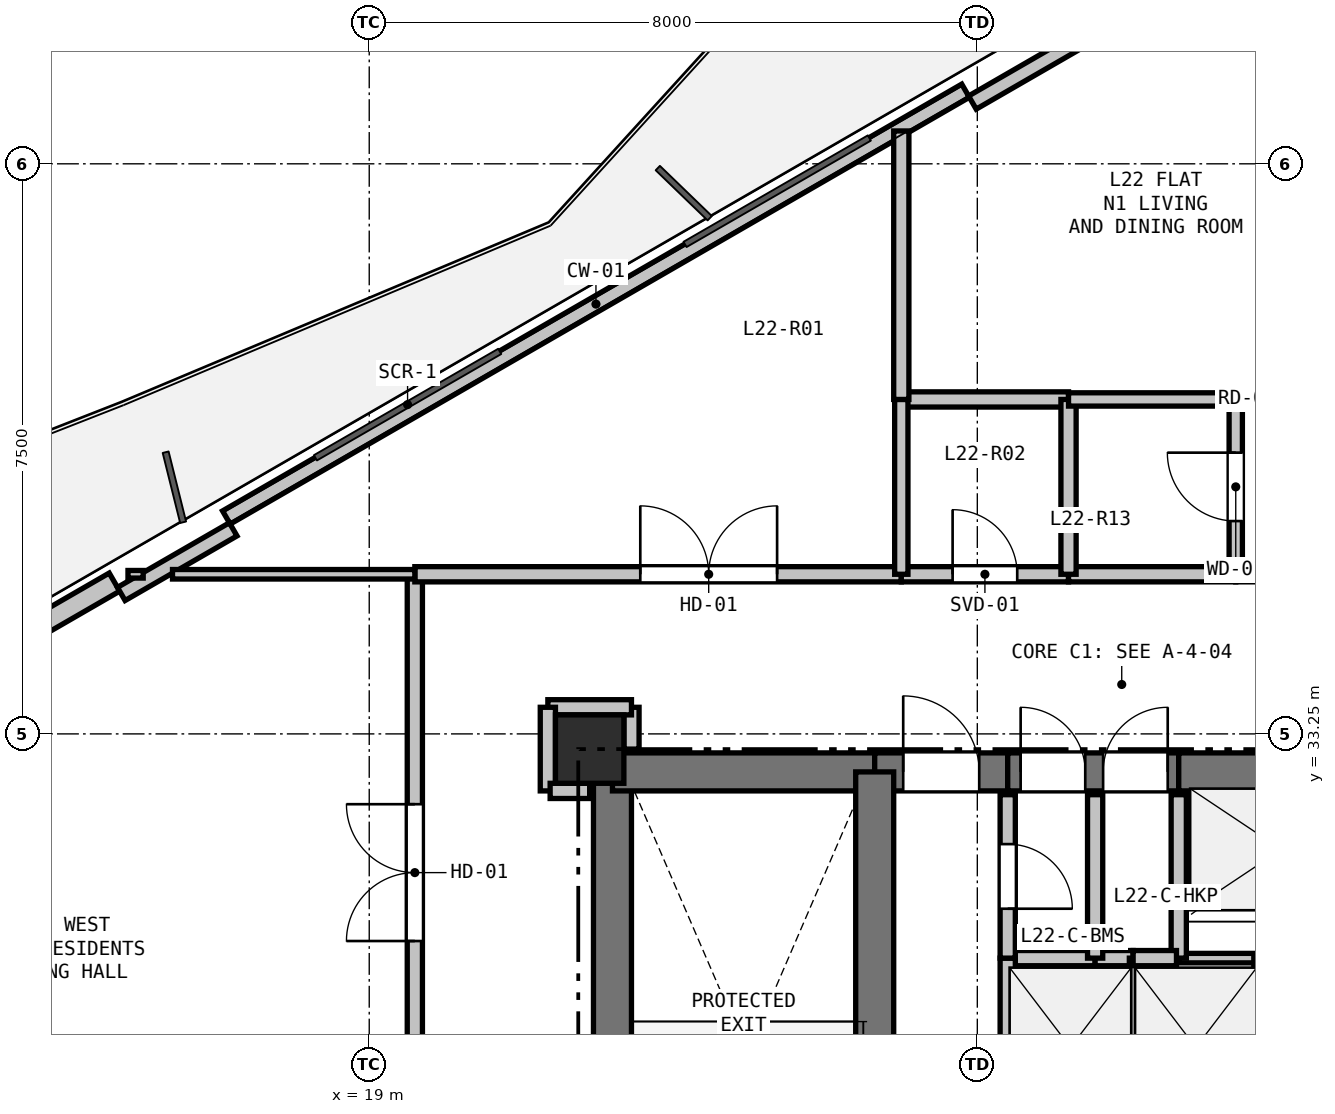
"""IFC4 building model, lengths in metres.
Left out: names, types, materials, properties, quantities, classifications, styles, units other than length and angle.
Written with IfcOpenShell. Run it as: python <this file> out.ifc"""

import sys

from ifc_helpers import new_model, si_unit, direction, frame, frame_2d, origin, origin_2d, place, context, subcontext, project, spatial, rectangle, extrude, element, fill, save


model = new_model("IFC4")
c1 = context("Model", 3, precision=1e-05, world=origin(), true_north=direction((0.0, 1.0)))
c2 = subcontext(c1, "Body", "Model", "MODEL_VIEW")
j1 = project(units=[si_unit("LENGTHUNIT", "METRE"), si_unit("PLANEANGLEUNIT", "RADIAN")], contexts=[c1])
p1 = place(None, origin())
s1 = spatial("IfcSite", under=j1, at=p1, CompositionType="ELEMENT")
p2 = place(p1, origin())
s2 = spatial("IfcBuilding", under=s1, at=p2, CompositionType="ELEMENT")
p3 = place(p2, frame((0.0, 0.0, 83.4)))
s3 = spatial("IfcBuildingStorey", under=s2, at=p3, CompositionType="ELEMENT", Elevation=83.4)
p4 = place(p3, frame((21.9, 33.05, 0.0), z_axis=(0.0, 0.0, 1.0), x_axis=(1.0, 0.0, 0.0)))
e1 = element("IfcColumn", 1, at=p4, inside=s3, PredefinedType="COLUMN", context=c2, shape_type="SweptSolid", body=[
    extrude(rectangle(XDim=0.9, YDim=0.9, at=origin_2d()), origin(), (0.0, 0.0, 1.0), 3.3),
])
p5 = place(p3, frame((5.317, 29.282, 0.0), z_axis=(0.0, 0.0, 1.0), x_axis=(0.866023023012, 0.500004123596, 0.0)))
e2 = element("IfcWall", 2, at=p5, inside=s3, PredefinedType="SOLIDWALL", context=c2, shape_type="SweptSolid", body=[
    extrude(rectangle(XDim=11.93, YDim=0.275, at=frame_2d((5.965, 0.0))), origin(), (0.0, 0.0, 1.0), 2.67),
])
p6 = place(p5, frame((8.704, 0.0, 0.0)))
e3 = element("IfcOpeningElement", 3, at=p6, cuts=e2, PredefinedType="OPENING", context=c2, shape_type="SweptSolid", body=[
    extrude(rectangle(XDim=1.0, YDim=2.1, at=frame_2d((0.5, 1.05))), frame((0.0, 0.147, 0.0), z_axis=(0.0, -1.0, 0.0), x_axis=(1.0, 0.0, 0.0)), (0.0, 0.0, 1.0), 0.295),
])
p7 = place(p3, frame((17.12, 36.097, 0.0), z_axis=(0.0, 0.0, 1.0), x_axis=(0.866027010039, 0.499997217876, 0.0)))
e4 = element("IfcWall", 4, at=p7, inside=s3, PredefinedType="PARAPET", context=c2, shape_type="SweptSolid", body=[
    extrude(rectangle(XDim=11.229, YDim=0.2, at=frame_2d((5.615, 0.0))), origin(), (0.0, 0.0, 1.0), 0.2),
])
p8 = place(p3, frame((15.738, 35.091, 0.0), z_axis=(0.0, 0.0, 1.0), x_axis=(0.866025371046, 0.500000056704, 0.0)))
e5 = element("IfcWall", 5, at=p8, inside=s3, PredefinedType="PARAPET", context=c2, shape_type="SweptSolid", body=[
    extrude(rectangle(XDim=1.7, YDim=0.2, at=frame_2d((0.85, 0.0))), origin(), (0.0, 0.0, 1.0), 2.67),
])
p9 = place(p3, frame((26.935, 41.556, 0.0), z_axis=(0.0, 0.0, 1.0), x_axis=(0.86605165483, 0.499954529098, 0.0)))
e6 = element("IfcWall", 6, at=p9, inside=s3, PredefinedType="PARAPET", context=c2, shape_type="SweptSolid", body=[
    extrude(rectangle(XDim=1.7, YDim=0.2, at=frame_2d((0.85, 0.0))), origin(), (0.0, 0.0, 1.0), 2.67),
])
p10 = place(p3, frame((22.2, 25.4, 0.0), z_axis=(0.0, 0.0, 1.0), x_axis=(0.0, 1.0, 0.0)))
e7 = element("IfcWall", 7, at=p10, inside=s3, PredefinedType="SHEAR", context=c2, shape_type="SweptSolid", body=[
    extrude(rectangle(XDim=7.35, YDim=0.5, at=frame_2d((3.675, 0.0))), origin(), (0.0, 0.0, 1.0), 3.05),
])
p11 = place(p3, frame((22.2, 32.75, 0.0), z_axis=(0.0, 0.0, 1.0), x_axis=(1.0, 0.0, 0.0)))
e8 = element("IfcWall", 8, at=p11, inside=s3, PredefinedType="SHEAR", context=c2, shape_type="SweptSolid", body=[
    extrude(rectangle(XDim=3.45, YDim=0.5, at=frame_2d((1.725, 0.0))), origin(), (0.0, 0.0, 1.0), 3.05),
])
p12 = place(p3, frame((25.65, 32.75, 0.0), z_axis=(0.0, 0.0, 1.0), x_axis=(1.0, 0.0, 0.0)))
e9 = element("IfcWall", 9, at=p12, inside=s3, PredefinedType="SHEAR", context=c2, shape_type="SweptSolid", body=[
    extrude(rectangle(XDim=1.75, YDim=0.5, at=frame_2d((0.875, 0.0))), origin(), (0.0, 0.0, 1.0), 3.05),
])
p13 = place(p12, frame((0.375, 0.0, 0.0)))
e10 = element("IfcOpeningElement", 10, at=p13, cuts=e9, PredefinedType="OPENING", context=c2, shape_type="SweptSolid", body=[
    extrude(rectangle(XDim=1.0, YDim=2.15, at=frame_2d((0.5, 1.075))), frame((0.0, 0.26, 0.0), z_axis=(0.0, -1.0, 0.0), x_axis=(1.0, 0.0, 0.0)), (0.0, 0.0, 1.0), 0.52),
])
p14 = place(p3, frame((27.4, 32.75, 0.0), z_axis=(0.0, 0.0, 1.0), x_axis=(1.0, 0.0, 0.0)))
e11 = element("IfcWall", 11, at=p14, inside=s3, PredefinedType="SHEAR", context=c2, shape_type="SweptSolid", body=[
    extrude(rectangle(XDim=2.25, YDim=0.5, at=frame_2d((1.125, 0.0))), origin(), (0.0, 0.0, 1.0), 3.05),
])
p15 = place(p14, frame((0.17, 0.0, 0.0)))
e12 = element("IfcOpeningElement", 12, at=p15, cuts=e11, PredefinedType="OPENING", context=c2, shape_type="SweptSolid", body=[
    extrude(rectangle(XDim=0.85, YDim=2.1, at=frame_2d((0.425, 1.05))), frame((0.0, 0.26, 0.0), z_axis=(0.0, -1.0, 0.0), x_axis=(1.0, 0.0, 0.0)), (0.0, 0.0, 1.0), 0.52),
])
p16 = place(p14, frame((1.255, 0.0, 0.0)))
e13 = element("IfcOpeningElement", 13, at=p16, cuts=e11, PredefinedType="OPENING", context=c2, shape_type="SweptSolid", body=[
    extrude(rectangle(XDim=0.85, YDim=2.1, at=frame_2d((0.425, 1.05))), frame((0.0, 0.26, 0.0), z_axis=(0.0, -1.0, 0.0), x_axis=(1.0, 0.0, 0.0)), (0.0, 0.0, 1.0), 0.52),
])
p17 = place(p3, frame((29.65, 32.75, 0.0), z_axis=(0.0, 0.0, 1.0), x_axis=(1.0, 0.0, 0.0)))
e14 = element("IfcWall", 14, at=p17, inside=s3, PredefinedType="SHEAR", context=c2, shape_type="SweptSolid", body=[
    extrude(rectangle(XDim=2.7, YDim=0.5, at=frame_2d((1.35, 0.0))), origin(), (0.0, 0.0, 1.0), 3.05),
])
p18 = place(p3, frame((25.65, 27.95, 0.0), z_axis=(0.0, 0.0, 1.0), x_axis=(0.0, 1.0, 0.0)))
e15 = element("IfcWall", 15, at=p18, inside=s3, PredefinedType="SHEAR", context=c2, shape_type="SweptSolid", body=[
    extrude(rectangle(XDim=4.8, YDim=0.5, at=frame_2d((2.4, 0.0))), origin(), (0.0, 0.0, 1.0), 3.05),
])
p19 = place(p3, frame((30.7, 30.3, 0.0), z_axis=(0.0, 0.0, 1.0), x_axis=(-1.0, 0.0, 0.0)))
e16 = element("IfcWall", 16, at=p19, inside=s3, PredefinedType="PARTITIONING", context=c2, shape_type="SweptSolid", body=[
    extrude(rectangle(XDim=1.05, YDim=0.125, at=frame_2d((0.525, 0.0))), origin(), (0.0, 0.0, 1.0), 3.05),
])
p20 = place(p3, frame((29.65, 30.3, 0.0), z_axis=(0.0, 0.0, 1.0), x_axis=(0.0, 1.0, 0.0)))
e17 = element("IfcWall", 17, at=p20, inside=s3, PredefinedType="PARTITIONING", context=c2, shape_type="SweptSolid", body=[
    extrude(rectangle(XDim=2.15, YDim=0.2, at=frame_2d((1.075, 0.0))), origin(), (0.0, 0.0, 1.0), 3.05),
])
p21 = place(p3, frame((27.4, 30.3, 0.0), z_axis=(0.0, 0.0, 1.0), x_axis=(1.0, 0.0, 0.0)))
e18 = element("IfcWall", 18, at=p21, inside=s3, PredefinedType="PARTITIONING", context=c2, shape_type="SweptSolid", body=[
    extrude(rectangle(XDim=1.15, YDim=0.2, at=frame_2d((0.575, 0.0))), origin(), (0.0, 0.0, 1.0), 3.05),
])
p22 = place(p3, frame((28.55, 30.3, 0.0), z_axis=(0.0, 0.0, 1.0), x_axis=(1.0, 0.0, 0.0)))
e19 = element("IfcWall", 19, at=p22, inside=s3, PredefinedType="PARTITIONING", context=c2, shape_type="SweptSolid", body=[
    extrude(rectangle(XDim=0.5, YDim=0.2, at=frame_2d((0.25, 0.0))), origin(), (0.0, 0.0, 1.0), 3.05),
])
p23 = place(p3, frame((29.05, 30.3, 0.0), z_axis=(0.0, 0.0, 1.0), x_axis=(0.0, -1.0, 0.0)))
e20 = element("IfcWall", 20, at=p23, inside=s3, PredefinedType="PARTITIONING", context=c2, shape_type="SweptSolid", body=[
    extrude(rectangle(XDim=2.2, YDim=0.1, at=frame_2d((1.1, 0.0))), origin(), (0.0, 0.0, 1.0), 3.05),
])
p24 = place(p3, frame((27.4, 28.1, 0.0), z_axis=(0.0, 0.0, 1.0), x_axis=(0.0, 1.0, 0.0)))
e21 = element("IfcWall", 21, at=p24, inside=s3, PredefinedType="PARTITIONING", context=c2, shape_type="SweptSolid", body=[
    extrude(rectangle(XDim=2.2, YDim=0.2, at=frame_2d((1.1, 0.0))), origin(), (0.0, 0.0, 1.0), 3.05),
])
p25 = place(p3, frame((29.05, 30.3, 0.0), z_axis=(0.0, 0.0, 1.0), x_axis=(1.0, 0.0, 0.0)))
e22 = element("IfcWall", 22, at=p25, inside=s3, PredefinedType="PARTITIONING", context=c2, shape_type="SweptSolid", body=[
    extrude(rectangle(XDim=0.57, YDim=0.2, at=frame_2d((0.285, 0.0))), origin(), (0.0, 0.0, 1.0), 3.05),
])
p26 = place(p3, frame((30.7, 30.3, 0.0), z_axis=(0.0, 0.0, 1.0), x_axis=(0.0, -1.0, 0.0)))
e23 = element("IfcWall", 23, at=p26, inside=s3, PredefinedType="PARTITIONING", context=c2, shape_type="SweptSolid", body=[
    extrude(rectangle(XDim=2.2, YDim=0.125, at=frame_2d((1.1, 0.0))), origin(), (0.0, 0.0, 1.0), 3.05),
])
p27 = place(p3, frame((27.4, 32.45, 0.0), z_axis=(0.0, 0.0, 1.0), x_axis=(0.0, -1.0, 0.0)))
e24 = element("IfcWall", 24, at=p27, inside=s3, PredefinedType="PARTITIONING", context=c2, shape_type="SweptSolid", body=[
    extrude(rectangle(XDim=2.15, YDim=0.2, at=frame_2d((1.075, 0.0))), origin(), (0.0, 0.0, 1.0), 3.05),
])
p28 = place(p27, frame((0.65, 0.0, 0.0)))
e25 = element("IfcOpeningElement", 25, at=p28, cuts=e24, PredefinedType="OPENING", context=c2, shape_type="SweptSolid", body=[
    extrude(rectangle(XDim=0.85, YDim=2.1, at=frame_2d((0.425, 1.05))), frame((0.0, 0.11, 0.0), z_axis=(0.0, -1.0, 0.0), x_axis=(1.0, 0.0, 0.0)), (0.0, 0.0, 1.0), 0.22),
])
p29 = place(p3, frame((19.6, 27.5, 0.0), z_axis=(0.0, 0.0, 1.0), x_axis=(0.0, 1.0, 0.0)))
e26 = element("IfcWall", 26, at=p29, inside=s3, PredefinedType="PARTITIONING", context=c2, shape_type="SweptSolid", body=[
    extrude(rectangle(XDim=7.85, YDim=0.2, at=frame_2d((3.925, 0.0))), origin(), (0.0, 0.0, 1.0), 2.423),
])
p30 = place(p29, frame((3.025, 0.0, 0.0)))
e27 = element("IfcOpeningElement", 27, at=p30, cuts=e26, PredefinedType="OPENING", context=c2, shape_type="SweptSolid", body=[
    extrude(rectangle(XDim=1.8, YDim=2.2, at=frame_2d((0.9, 1.1))), frame((0.0, 0.11, 0.0), z_axis=(0.0, -1.0, 0.0), x_axis=(1.0, 0.0, 0.0)), (0.0, 0.0, 1.0), 0.22),
])
p31 = place(p3, frame((19.6, 35.35, 0.0), z_axis=(0.0, 0.0, 1.0), x_axis=(1.0, 0.0, 0.0)))
e28 = element("IfcWall", 28, at=p31, inside=s3, PredefinedType="PARTITIONING", context=c2, shape_type="SweptSolid", body=[
    extrude(rectangle(XDim=6.4, YDim=0.2, at=frame_2d((3.2, 0.0))), origin(), (0.0, 0.0, 1.0), 3.05),
])
p32 = place(p31, frame((2.966, 0.0, 0.0)))
e29 = element("IfcOpeningElement", 29, at=p32, cuts=e28, PredefinedType="OPENING", context=c2, shape_type="SweptSolid", body=[
    extrude(rectangle(XDim=1.8, YDim=2.2, at=frame_2d((0.9, 1.1))), frame((0.0, 0.11, 0.0), z_axis=(0.0, -1.0, 0.0), x_axis=(1.0, 0.0, 0.0)), (0.0, 0.0, 1.0), 0.22),
])
p33 = place(p3, frame((26.0, 35.35, 0.0), z_axis=(0.0, 0.0, 1.0), x_axis=(1.0, 0.0, 0.0)))
e30 = element("IfcWall", 30, at=p33, inside=s3, PredefinedType="PARTITIONING", context=c2, shape_type="SweptSolid", body=[
    extrude(rectangle(XDim=2.2, YDim=0.2, at=frame_2d((1.1, 0.0))), origin(), (0.0, 0.0, 1.0), 3.05),
])
p34 = place(p33, frame((0.675, 0.0, 0.0)))
e31 = element("IfcOpeningElement", 31, at=p34, cuts=e30, PredefinedType="OPENING", context=c2, shape_type="SweptSolid", body=[
    extrude(rectangle(XDim=0.85, YDim=2.1, at=frame_2d((0.425, 1.05))), frame((0.0, 0.11, 0.0), z_axis=(0.0, -1.0, 0.0), x_axis=(1.0, 0.0, 0.0)), (0.0, 0.0, 1.0), 0.22),
])
p35 = place(p3, frame((28.2, 35.35, 0.0), z_axis=(0.0, 0.0, 1.0), x_axis=(1.0, 0.0, 0.0)))
e32 = element("IfcWall", 32, at=p35, inside=s3, PredefinedType="PARTITIONING", context=c2, shape_type="SweptSolid", body=[
    extrude(rectangle(XDim=2.2, YDim=0.2, at=frame_2d((1.1, 0.0))), origin(), (0.0, 0.0, 1.0), 3.05),
])
p36 = place(p3, frame((30.4, 35.35, 0.0), z_axis=(0.0, 0.0, 1.0), x_axis=(1.0, 0.0, 0.0)))
e33 = element("IfcWall", 33, at=p36, inside=s3, PredefinedType="PARTITIONING", context=c2, shape_type="SweptSolid", body=[
    extrude(rectangle(XDim=2.8, YDim=0.2, at=frame_2d((1.4, 0.0))), origin(), (0.0, 0.0, 1.0), 3.05),
])
p37 = place(p36, frame((0.9, 0.0, 0.0)))
e34 = element("IfcOpeningElement", 34, at=p37, cuts=e33, PredefinedType="OPENING", context=c2, shape_type="SweptSolid", body=[
    extrude(rectangle(XDim=1.0, YDim=2.15, at=frame_2d((0.5, 1.075))), frame((0.0, 0.11, 0.0), z_axis=(0.0, -1.0, 0.0), x_axis=(1.0, 0.0, 0.0)), (0.0, 0.0, 1.0), 0.22),
])
p38 = place(p3, frame((22.45, 33.05, 0.0), z_axis=(0.0, 0.0, 1.0), x_axis=(0.0, 1.0, 0.0)))
e35 = element("IfcWall", 35, at=p38, inside=s3, PredefinedType="PARTITIONING", context=c2, shape_type="SweptSolid", body=[
    extrude(rectangle(XDim=0.55, YDim=0.2, at=frame_2d((0.275, 0.0))), origin(), (0.0, 0.0, 1.0), 2.498),
])
p39 = place(p3, frame((22.45, 33.6, 0.0), z_axis=(0.0, 0.0, 1.0), x_axis=(-1.0, 0.0, 0.0)))
e36 = element("IfcWall", 36, at=p39, inside=s3, PredefinedType="PARTITIONING", context=c2, shape_type="SweptSolid", body=[
    extrude(rectangle(XDim=1.1, YDim=0.2, at=frame_2d((0.55, 0.0))), origin(), (0.0, 0.0, 1.0), 3.05),
])
p40 = place(p3, frame((21.35, 33.6, 0.0), z_axis=(0.0, 0.0, 1.0), x_axis=(0.0, -1.0, 0.0)))
e37 = element("IfcWall", 37, at=p40, inside=s3, PredefinedType="PARTITIONING", context=c2, shape_type="SweptSolid", body=[
    extrude(rectangle(XDim=1.1, YDim=0.2, at=frame_2d((0.55, 0.0))), origin(), (0.0, 0.0, 1.0), 2.423),
])
p41 = place(p3, frame((21.38, 32.5, 0.0), z_axis=(0.0, 0.0, 1.0), x_axis=(1.0, 0.0, 0.0)))
e38 = element("IfcWall", 38, at=p41, inside=s3, PredefinedType="PARTITIONING", context=c2, shape_type="SweptSolid", body=[
    extrude(rectangle(XDim=0.52, YDim=0.2, at=frame_2d((0.26, 0.0))), origin(), (0.0, 0.0, 1.0), 2.498),
])
p42 = place(p3, frame((30.4, 37.65, 0.0), z_axis=(0.0, 0.0, 1.0), x_axis=(1.0, 0.0, 0.0)))
e39 = element("IfcWall", 39, at=p42, inside=s3, PredefinedType="PARTITIONING", context=c2, shape_type="SweptSolid", body=[
    extrude(rectangle(XDim=2.8, YDim=0.1, at=frame_2d((1.4, 0.0))), origin(), (0.0, 0.0, 1.0), 3.05),
])
p43 = place(p42, frame((0.925, 0.0, 0.0)))
e40 = element("IfcOpeningElement", 40, at=p43, cuts=e39, PredefinedType="OPENING", context=c2, shape_type="SweptSolid", body=[
    extrude(rectangle(XDim=0.95, YDim=2.1, at=frame_2d((0.475, 1.05))), frame((0.0, 0.06, 0.0), z_axis=(0.0, -1.0, 0.0), x_axis=(1.0, 0.0, 0.0)), (0.0, 0.0, 1.0), 0.12),
])
p44 = place(p3, frame((30.4, 35.35, 0.0), z_axis=(0.0, 0.0, 1.0), x_axis=(0.0, 1.0, 0.0)))
e41 = element("IfcWall", 41, at=p44, inside=s3, PredefinedType="PLUMBINGWALL", context=c2, shape_type="SweptSolid", body=[
    extrude(rectangle(XDim=2.3, YDim=0.175, at=frame_2d((1.15, 0.0))), origin(), (0.0, 0.0, 1.0), 3.05),
])
p45 = place(p44, frame((0.7, 0.0, 0.0)))
e42 = element("IfcOpeningElement", 42, at=p45, cuts=e41, PredefinedType="OPENING", context=c2, shape_type="SweptSolid", body=[
    extrude(rectangle(XDim=0.9, YDim=2.1, at=frame_2d((0.45, 1.05))), frame((0.0, 0.097, 0.0), z_axis=(0.0, -1.0, 0.0), x_axis=(1.0, 0.0, 0.0)), (0.0, 0.0, 1.0), 0.195),
])
p46 = place(p3, frame((26.0, 37.65, 0.0), z_axis=(0.0, 0.0, 1.0), x_axis=(1.0, 0.0, 0.0)))
e43 = element("IfcWall", 43, at=p46, inside=s3, PredefinedType="PARTITIONING", context=c2, shape_type="SweptSolid", body=[
    extrude(rectangle(XDim=2.2, YDim=0.2, at=frame_2d((1.1, 0.0))), origin(), (0.0, 0.0, 1.0), 3.05),
])
p47 = place(p3, frame((28.2, 37.65, 0.0), z_axis=(0.0, 0.0, 1.0), x_axis=(0.0, -1.0, 0.0)))
e44 = element("IfcWall", 44, at=p47, inside=s3, PredefinedType="PARTITIONING", context=c2, shape_type="SweptSolid", body=[
    extrude(rectangle(XDim=2.3, YDim=0.2, at=frame_2d((1.15, 0.0))), origin(), (0.0, 0.0, 1.0), 3.05),
])
p48 = place(p3, frame((26.0, 35.35, 0.0), z_axis=(0.0, 0.0, 1.0), x_axis=(0.0, 1.0, 0.0)))
e45 = element("IfcWall", 45, at=p48, inside=s3, PredefinedType="PLUMBINGWALL", context=c2, shape_type="SweptSolid", body=[
    extrude(rectangle(XDim=2.3, YDim=0.175, at=frame_2d((1.15, 0.0))), origin(), (0.0, 0.0, 1.0), 3.05),
])
p49 = place(p3, frame((28.2, 37.65, 0.0), z_axis=(0.0, 0.0, 1.0), x_axis=(1.0, 0.0, 0.0)))
e46 = element("IfcWall", 46, at=p49, inside=s3, PredefinedType="PLUMBINGWALL", context=c2, shape_type="SweptSolid", body=[
    extrude(rectangle(XDim=2.2, YDim=0.175, at=frame_2d((1.1, 0.0))), origin(), (0.0, 0.0, 1.0), 3.05),
])
p50 = place(p3, frame((28.55, 32.45, 0.0), z_axis=(0.0, 0.0, 1.0), x_axis=(0.0, -1.0, 0.0)))
e47 = element("IfcWall", 47, at=p50, inside=s3, PredefinedType="PARTITIONING", context=c2, shape_type="SweptSolid", body=[
    extrude(rectangle(XDim=2.15, YDim=0.2, at=frame_2d((1.075, 0.0))), origin(), (0.0, 0.0, 1.0), 3.05),
])
p51 = place(p3, frame((26.0, 41.182, 0.0), z_axis=(0.0, 0.0, 1.0), x_axis=(0.0, -1.0, 0.0)))
e48 = element("IfcWall", 48, at=p51, inside=s3, PredefinedType="PARTITIONING", context=c2, shape_type="SweptSolid", body=[
    extrude(rectangle(XDim=3.532, YDim=0.2, at=frame_2d((1.766, 0.0))), origin(), (0.0, 0.0, 1.0), 2.365),
])
p52 = place(p3, frame((19.6, 35.35, 0.0), z_axis=(0.0, 0.0, 1.0), x_axis=(-1.0, 0.0, 0.0)))
e49 = element("IfcWall", 49, at=p52, inside=s3, PredefinedType="PARTITIONING", context=c2, shape_type="SweptSolid", body=[
    extrude(rectangle(XDim=3.188, YDim=0.125, at=frame_2d((1.594, 0.0))), origin(), (0.0, 0.0, 1.0), 2.365),
])
p53 = place(p3, frame((16.026, 35.35, 0.0), z_axis=(0.0, 0.0, 1.0), x_axis=(-1.0, 0.0, 0.0)))
e50 = element("IfcWall", 50, at=p53, inside=s3, PredefinedType="PARTITIONING", context=c2, shape_type="SweptSolid", body=[
    extrude(rectangle(XDim=0.2, YDim=0.1, at=frame_2d((0.1, 0.0))), origin(), (0.0, 0.0, 1.0), 3.05),
])
p54 = place(p13, origin())
e51 = element("IfcDoor", 51, at=p54, inside=s3, OperationType="SINGLE_SWING_LEFT", PredefinedType="DOOR", context=c2, shape_type="SweptSolid", body=[
    extrude(rectangle(XDim=1.0, YDim=2.15, at=frame_2d((0.5, 1.075))), frame((0.0, 0.025, 0.0), z_axis=(0.0, -1.0, 0.0), x_axis=(1.0, 0.0, 0.0)), (0.0, 0.0, 1.0), 0.05),
])
fill(e10, e51)
p55 = place(p28, origin())
e52 = element("IfcDoor", 52, at=p55, inside=s3, OperationType="SINGLE_SWING_RIGHT", PredefinedType="DOOR", context=c2, shape_type="SweptSolid", body=[
    extrude(rectangle(XDim=0.85, YDim=2.1, at=frame_2d((0.425, 1.05))), frame((0.0, 0.025, 0.0), z_axis=(0.0, -1.0, 0.0), x_axis=(1.0, 0.0, 0.0)), (0.0, 0.0, 1.0), 0.05),
])
fill(e25, e52)
p56 = place(p34, origin())
e53 = element("IfcDoor", 53, at=p56, inside=s3, OperationType="SINGLE_SWING_LEFT", PredefinedType="DOOR", context=c2, shape_type="SweptSolid", body=[
    extrude(rectangle(XDim=0.85, YDim=2.1, at=frame_2d((0.425, 1.05))), frame((0.0, 0.025, 0.0), z_axis=(0.0, -1.0, 0.0), x_axis=(1.0, 0.0, 0.0)), (0.0, 0.0, 1.0), 0.05),
])
fill(e31, e53)
p57 = place(p15, origin())
e54 = element("IfcDoor", 54, at=p57, inside=s3, OperationType="SINGLE_SWING_LEFT", PredefinedType="DOOR", context=c2, shape_type="SweptSolid", body=[
    extrude(rectangle(XDim=0.85, YDim=2.1, at=frame_2d((0.425, 1.05))), frame((0.0, 0.025, 0.0), z_axis=(0.0, -1.0, 0.0), x_axis=(1.0, 0.0, 0.0)), (0.0, 0.0, 1.0), 0.05),
])
fill(e12, e54)
p58 = place(p16, origin())
e55 = element("IfcDoor", 55, at=p58, inside=s3, OperationType="SINGLE_SWING_RIGHT", PredefinedType="DOOR", context=c2, shape_type="SweptSolid", body=[
    extrude(rectangle(XDim=0.85, YDim=2.1, at=frame_2d((0.425, 1.05))), frame((0.0, 0.025, 0.0), z_axis=(0.0, -1.0, 0.0), x_axis=(1.0, 0.0, 0.0)), (0.0, 0.0, 1.0), 0.05),
])
fill(e13, e55)
p59 = place(p32, origin())
e56 = element("IfcDoor", 56, at=p59, inside=s3, OperationType="DOUBLE_DOOR_SINGLE_SWING", PredefinedType="DOOR", context=c2, shape_type="SweptSolid", body=[
    extrude(rectangle(XDim=1.8, YDim=2.2, at=frame_2d((0.9, 1.1))), frame((0.0, 0.025, 0.0), z_axis=(0.0, -1.0, 0.0), x_axis=(1.0, 0.0, 0.0)), (0.0, 0.0, 1.0), 0.05),
])
fill(e29, e56)
p60 = place(p30, origin())
e57 = element("IfcDoor", 57, at=p60, inside=s3, OperationType="DOUBLE_DOOR_SINGLE_SWING", PredefinedType="DOOR", context=c2, shape_type="SweptSolid", body=[
    extrude(rectangle(XDim=1.8, YDim=2.2, at=frame_2d((0.9, 1.1))), frame((0.0, 0.025, 0.0), z_axis=(0.0, -1.0, 0.0), x_axis=(1.0, 0.0, 0.0)), (0.0, 0.0, 1.0), 0.05),
])
fill(e27, e57)
p61 = place(p45, origin())
e58 = element("IfcDoor", 58, at=p61, inside=s3, OperationType="SINGLE_SWING_RIGHT", PredefinedType="DOOR", context=c2, shape_type="SweptSolid", body=[
    extrude(rectangle(XDim=0.9, YDim=2.1, at=frame_2d((0.45, 1.05))), frame((0.0, 0.025, 0.0), z_axis=(0.0, -1.0, 0.0), x_axis=(1.0, 0.0, 0.0)), (0.0, 0.0, 1.0), 0.05),
])
fill(e42, e58)
save(model, sys.argv[1])
